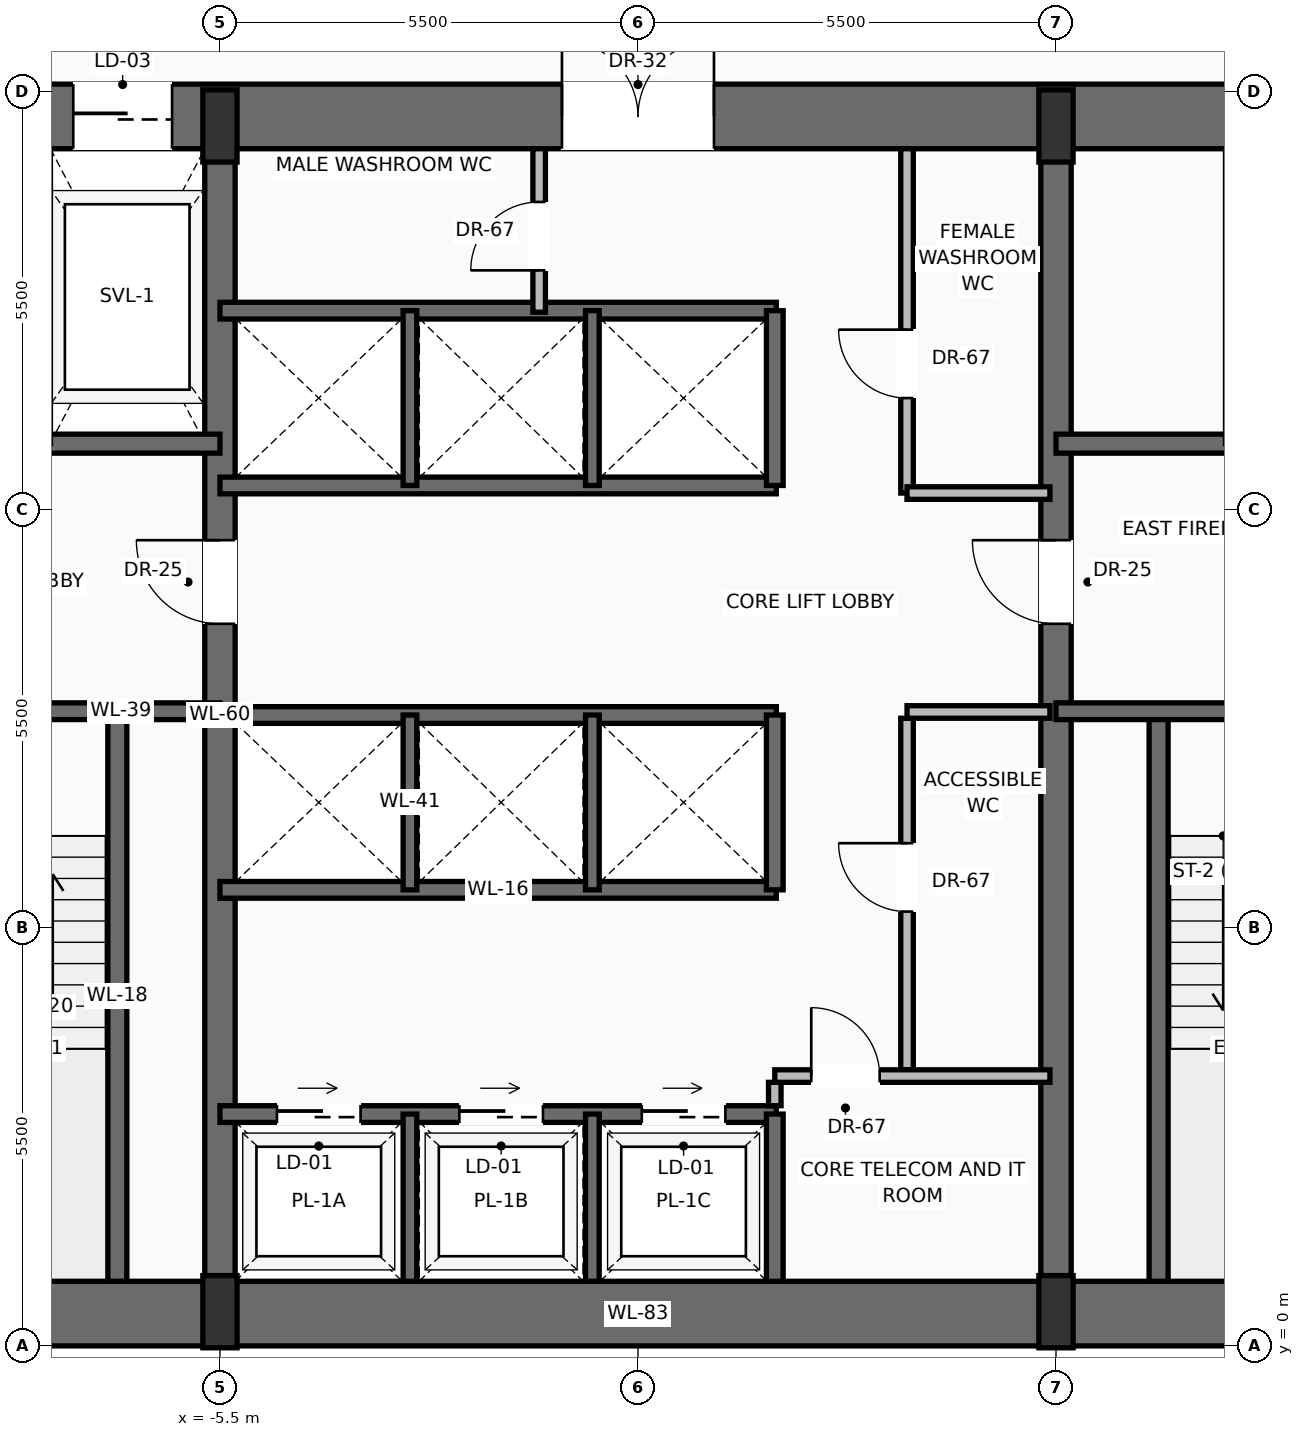
"""IFC4 building model, lengths in metres.
Left out: names, types, materials, properties, quantities, classifications, styles, units other than length and angle.
Written with IfcOpenShell. Run it as: python <this file> out.ifc"""

import sys

from ifc_helpers import new_model, si_unit, direction, frame, frame_2d, origin, origin_2d, place, context, subcontext, project, spatial, rectangle, extrude, source, transform, mapped, element, fill, save


model = new_model("IFC4")
c1 = context("Model", 3, precision=1e-05, world=origin(), true_north=direction((0.0, 1.0)))
c2 = subcontext(c1, "Body", "Model", "MODEL_VIEW")
j1 = project(units=[si_unit("LENGTHUNIT", "METRE"), si_unit("PLANEANGLEUNIT", "RADIAN")], contexts=[c1])
p1 = place(None, origin())
s1 = spatial("IfcSite", under=j1, at=p1, CompositionType="ELEMENT")
p2 = place(p1, origin())
s2 = spatial("IfcBuilding", under=s1, at=p2, CompositionType="ELEMENT")
p3 = place(p2, frame((0.0, 0.0, 60.8)))
s3 = spatial("IfcBuildingStorey", under=s2, at=p3, CompositionType="ELEMENT", Elevation=60.8)
p4 = place(p3, frame((-10.65, 0.425, 0.0), z_axis=(0.0, 0.0, 1.0), x_axis=(1.0, 0.0, 0.0)))
e1 = element("IfcWall", 1, at=p4, inside=s3, PredefinedType="SHEAR", context=c2, shape_type="SweptSolid", body=[
    extrude(rectangle(XDim=21.3, YDim=0.85, at=frame_2d((10.65, 0.0))), origin(), (0.0, 0.0, 1.0), 3.45),
])
p5 = place(p3, frame((-11.0, 16.175, 0.0), z_axis=(0.0, 0.0, 1.0), x_axis=(1.0, 0.0, 0.0)))
e2 = element("IfcWall", 2, at=p5, inside=s3, PredefinedType="SHEAR", context=c2, shape_type="SweptSolid", body=[
    extrude(rectangle(XDim=22.0, YDim=0.85, at=frame_2d((11.0, 0.0))), origin(), (0.0, 0.0, 1.0), 3.45),
])
p6 = place(p5, frame((3.57, 0.0, 0.0)))
e3 = element("IfcOpeningElement", 3, at=p6, cuts=e2, PredefinedType="OPENING", context=c2, shape_type="SweptSolid", body=[
    extrude(rectangle(XDim=1.3, YDim=2.3, at=frame_2d((0.65, 1.15))), frame((0.0, 0.435, 0.0), z_axis=(0.0, -1.0, 0.0), x_axis=(1.0, 0.0, 0.0)), (0.0, 0.0, 1.0), 0.87),
])
p7 = place(p5, frame((10.0, 0.0, 0.0)))
e4 = element("IfcOpeningElement", 4, at=p7, cuts=e2, PredefinedType="OPENING", context=c2, shape_type="SweptSolid", body=[
    extrude(rectangle(XDim=2.0, YDim=2.4, at=frame_2d((1.0, 1.2))), frame((0.0, 0.435, 0.0), z_axis=(0.0, -1.0, 0.0), x_axis=(1.0, 0.0, 0.0)), (0.0, 0.0, 1.0), 0.87),
])
p8 = place(p3, frame((-5.5, 0.425, 0.0), z_axis=(0.0, 0.0, 1.0), x_axis=(0.0, 1.0, 0.0)))
e5 = element("IfcWall", 5, at=p8, inside=s3, PredefinedType="SHEAR", context=c2, shape_type="SweptSolid", body=[
    extrude(rectangle(XDim=15.75, YDim=0.4, at=frame_2d((7.875, 0.0))), origin(), (0.0, 0.0, 1.0), 3.45),
])
p9 = place(p8, frame((9.075, 0.0, 0.0)))
e6 = element("IfcOpeningElement", 6, at=p9, cuts=e5, PredefinedType="OPENING", context=c2, shape_type="SweptSolid", body=[
    extrude(rectangle(XDim=1.1, YDim=2.2, at=frame_2d((0.55, 1.1))), frame((0.0, 0.21, 0.0), z_axis=(0.0, -1.0, 0.0), x_axis=(1.0, 0.0, 0.0)), (0.0, 0.0, 1.0), 0.42),
])
p10 = place(p3, frame((5.5, 0.425, 0.0), z_axis=(0.0, 0.0, 1.0), x_axis=(0.0, 1.0, 0.0)))
e7 = element("IfcWall", 7, at=p10, inside=s3, PredefinedType="SHEAR", context=c2, shape_type="SweptSolid", body=[
    extrude(rectangle(XDim=15.75, YDim=0.4, at=frame_2d((7.875, 0.0))), origin(), (0.0, 0.0, 1.0), 3.45),
])
p11 = place(p10, frame((9.075, 0.0, 0.0)))
e8 = element("IfcOpeningElement", 8, at=p11, cuts=e7, PredefinedType="OPENING", context=c2, shape_type="SweptSolid", body=[
    extrude(rectangle(XDim=1.1, YDim=2.2, at=frame_2d((0.55, 1.1))), frame((0.0, 0.21, 0.0), z_axis=(0.0, -1.0, 0.0), x_axis=(1.0, 0.0, 0.0)), (0.0, 0.0, 1.0), 0.42),
])
m1 = source(origin(), c2, "Body", "SweptSolid", [
    extrude(rectangle(XDim=0.45, YDim=0.95, at=origin_2d()), origin(), (0.0, 0.0, 1.0), 3.7),
])
for number, where, z_axis, x_axis in (
    (9, (-5.5, 0.45, 0.0), (0.0, 0.0, 1.0), (1.0, 0.0, 0.0)),
    (10, (5.5, 0.45, 0.0), (0.0, 0.0, 1.0), (1.0, 0.0, 0.0)),
    (11, (-5.5, 16.05, 0.0), (0.0, 0.0, 1.0), (1.0, 0.0, 0.0)),
    (12, (5.5, 16.05, 0.0), (0.0, 0.0, 1.0), (1.0, 0.0, 0.0)),
):
    element("IfcColumn", number, at=place(p3, frame(where, z_axis=z_axis, x_axis=x_axis)), inside=s3, PredefinedType="PILASTER", context=c2, shape_type="MappedRepresentation", body=[
        mapped(m1, transform((0.0, 0.0, 0.0), scale=1.0)),
    ])
p12 = place(p3, frame((-6.85, 0.85, 0.0), z_axis=(0.0, 0.0, 1.0), x_axis=(0.0, 1.0, 0.0)))
e13 = element("IfcWall", 13, at=p12, inside=s3, PredefinedType="SOLIDWALL", context=c2, shape_type="SweptSolid", body=[
    extrude(rectangle(XDim=7.5, YDim=0.25, at=frame_2d((3.75, 0.0))), origin(), (0.0, 0.0, 1.0), 3.45),
])
p13 = place(p3, frame((-5.5, 8.35, 0.0), z_axis=(0.0, 0.0, 1.0), x_axis=(-1.0, 0.0, 0.0)))
e14 = element("IfcWall", 14, at=p13, inside=s3, PredefinedType="SOLIDWALL", context=c2, shape_type="SweptSolid", body=[
    extrude(rectangle(XDim=4.65, YDim=0.22, at=frame_2d((2.325, 0.0))), origin(), (0.0, 0.0, 1.0), 3.45),
])
p14 = place(p13, frame((2.5, 0.0, 0.0)))
e15 = element("IfcOpeningElement", 15, at=p14, cuts=e14, PredefinedType="OPENING", context=c2, shape_type="SweptSolid", body=[
    extrude(rectangle(XDim=1.15, YDim=2.2, at=frame_2d((0.575, 1.1))), frame((0.0, 0.12, 0.0), z_axis=(0.0, -1.0, 0.0), x_axis=(1.0, 0.0, 0.0)), (0.0, 0.0, 1.0), 0.24),
])
p15 = place(p3, frame((-5.5, 11.87, 0.0), z_axis=(0.0, 0.0, 1.0), x_axis=(-1.0, 0.0, 0.0)))
e16 = element("IfcWall", 16, at=p15, inside=s3, PredefinedType="SOLIDWALL", context=c2, shape_type="SweptSolid", body=[
    extrude(rectangle(XDim=4.65, YDim=0.25, at=frame_2d((2.325, 0.0))), origin(), (0.0, 0.0, 1.0), 3.45),
])
p16 = place(p15, frame((2.95, 0.0, 0.0)))
e17 = element("IfcOpeningElement", 17, at=p16, cuts=e16, PredefinedType="OPENING", context=c2, shape_type="SweptSolid", body=[
    extrude(rectangle(XDim=1.2, YDim=2.25, at=frame_2d((0.6, 1.125))), frame((0.0, 0.135, 0.0), z_axis=(0.0, -1.0, 0.0), x_axis=(1.0, 0.0, 0.0)), (0.0, 0.0, 1.0), 0.27),
])
p17 = place(p3, frame((6.85, 0.85, 0.0), z_axis=(0.0, 0.0, 1.0), x_axis=(0.0, 1.0, 0.0)))
e18 = element("IfcWall", 18, at=p17, inside=s3, PredefinedType="SOLIDWALL", context=c2, shape_type="SweptSolid", body=[
    extrude(rectangle(XDim=7.5, YDim=0.25, at=frame_2d((3.75, 0.0))), origin(), (0.0, 0.0, 1.0), 3.45),
])
p18 = place(p3, frame((10.15, 8.35, 0.0), z_axis=(0.0, 0.0, 1.0), x_axis=(-1.0, 0.0, 0.0)))
e19 = element("IfcWall", 19, at=p18, inside=s3, PredefinedType="SOLIDWALL", context=c2, shape_type="SweptSolid", body=[
    extrude(rectangle(XDim=4.65, YDim=0.22, at=frame_2d((2.325, 0.0))), origin(), (0.0, 0.0, 1.0), 3.45),
])
p19 = place(p18, frame((1.0, 0.0, 0.0)))
e20 = element("IfcOpeningElement", 20, at=p19, cuts=e19, PredefinedType="OPENING", context=c2, shape_type="SweptSolid", body=[
    extrude(rectangle(XDim=1.15, YDim=2.2, at=frame_2d((0.575, 1.1))), frame((0.0, 0.12, 0.0), z_axis=(0.0, -1.0, 0.0), x_axis=(1.0, 0.0, 0.0)), (0.0, 0.0, 1.0), 0.24),
])
p20 = place(p3, frame((10.15, 11.87, 0.0), z_axis=(0.0, 0.0, 1.0), x_axis=(-1.0, 0.0, 0.0)))
e21 = element("IfcWall", 21, at=p20, inside=s3, PredefinedType="SOLIDWALL", context=c2, shape_type="SweptSolid", body=[
    extrude(rectangle(XDim=4.65, YDim=0.25, at=frame_2d((2.325, 0.0))), origin(), (0.0, 0.0, 1.0), 3.45),
])
p21 = place(p20, frame((0.5, 0.0, 0.0)))
e22 = element("IfcOpeningElement", 22, at=p21, cuts=e21, PredefinedType="OPENING", context=c2, shape_type="SweptSolid", body=[
    extrude(rectangle(XDim=1.2, YDim=2.25, at=frame_2d((0.6, 1.125))), frame((0.0, 0.135, 0.0), z_axis=(0.0, -1.0, 0.0), x_axis=(1.0, 0.0, 0.0)), (0.0, 0.0, 1.0), 0.27),
])
p22 = place(p3, frame((-5.5, 3.05, 0.0), z_axis=(0.0, 0.0, 1.0), x_axis=(1.0, 0.0, 0.0)))
e23 = element("IfcWall", 23, at=p22, inside=s3, PredefinedType="SOLIDWALL", context=c2, shape_type="SweptSolid", body=[
    extrude(rectangle(XDim=7.32, YDim=0.22, at=frame_2d((3.66, 0.0))), origin(), (0.0, 0.0, 1.0), 3.45),
])
p23 = place(p22, frame((0.75, 0.0, 0.0)))
e24 = element("IfcOpeningElement", 24, at=p23, cuts=e23, PredefinedType="OPENING", context=c2, shape_type="SweptSolid", body=[
    extrude(rectangle(XDim=1.1, YDim=2.2, at=frame_2d((0.55, 1.1))), frame((0.0, 0.12, 0.0), z_axis=(0.0, -1.0, 0.0), x_axis=(1.0, 0.0, 0.0)), (0.0, 0.0, 1.0), 0.24),
])
p24 = place(p22, frame((3.15, 0.0, 0.0)))
e25 = element("IfcOpeningElement", 25, at=p24, cuts=e23, PredefinedType="OPENING", context=c2, shape_type="SweptSolid", body=[
    extrude(rectangle(XDim=1.1, YDim=2.2, at=frame_2d((0.55, 1.1))), frame((0.0, 0.12, 0.0), z_axis=(0.0, -1.0, 0.0), x_axis=(1.0, 0.0, 0.0)), (0.0, 0.0, 1.0), 0.24),
])
p25 = place(p22, frame((5.55, 0.0, 0.0)))
e26 = element("IfcOpeningElement", 26, at=p25, cuts=e23, PredefinedType="OPENING", context=c2, shape_type="SweptSolid", body=[
    extrude(rectangle(XDim=1.1, YDim=2.2, at=frame_2d((0.55, 1.1))), frame((0.0, 0.12, 0.0), z_axis=(0.0, -1.0, 0.0), x_axis=(1.0, 0.0, 0.0)), (0.0, 0.0, 1.0), 0.24),
])
p26 = place(p3, frame((1.8, 0.85, 0.0), z_axis=(0.0, 0.0, 1.0), x_axis=(0.0, 1.0, 0.0)))
e27 = element("IfcWall", 27, at=p26, inside=s3, PredefinedType="SOLIDWALL", context=c2, shape_type="SweptSolid", body=[
    extrude(rectangle(XDim=2.2, YDim=0.22, at=frame_2d((1.1, 0.0))), origin(), (0.0, 0.0, 1.0), 3.45),
])
for number, where, z_axis, x_axis in (
    (28, (-3.0, 0.85, 0.0), (0.0, 0.0, 1.0), (0.0, 1.0, 0.0)),
    (29, (-0.6, 0.85, 0.0), (0.0, 0.0, 1.0), (0.0, 1.0, 0.0)),
):
    element("IfcWall", number, at=place(p3, frame(where, z_axis=z_axis, x_axis=x_axis)), inside=s3, PredefinedType="SOLIDWALL", context=c2, shape_type="SweptSolid", body=[
        extrude(rectangle(XDim=2.2, YDim=0.18, at=frame_2d((1.1, 0.0))), origin(), (0.0, 0.0, 1.0), 3.45),
    ])
p27 = place(p3, frame((1.8, 3.16, 0.0), z_axis=(0.0, 0.0, 1.0), x_axis=(0.0, 1.0, 0.0)))
e30 = element("IfcWall", 30, at=p27, inside=s3, PredefinedType="PARTITIONING", context=c2, shape_type="SweptSolid", body=[
    extrude(rectangle(XDim=0.308, YDim=0.165, at=frame_2d((0.154, 0.0))), origin(), (0.0, 0.0, 1.0), 3.442),
])
p28 = place(p3, frame((3.54, 3.633, 0.0), z_axis=(0.0, 0.0, 1.0), x_axis=(0.0, 1.0, 0.0)))
e31 = element("IfcWall", 31, at=p28, inside=s3, PredefinedType="PARTITIONING", context=c2, shape_type="SweptSolid", body=[
    extrude(rectangle(XDim=4.625, YDim=0.165, at=frame_2d((2.312, 0.0))), origin(), (0.0, 0.0, 1.0), 3.442),
])
p29 = place(p28, frame((2.081, 0.0, 0.0)))
e32 = element("IfcOpeningElement", 32, at=p29, cuts=e31, PredefinedType="OPENING", context=c2, shape_type="SweptSolid", body=[
    extrude(rectangle(XDim=0.9, YDim=2.1, at=frame_2d((0.45, 1.05))), frame((0.0, 0.093, 0.0), z_axis=(0.0, -1.0, 0.0), x_axis=(1.0, 0.0, 0.0)), (0.0, 0.0, 1.0), 0.185),
])
p30 = place(p3, frame((3.54, 8.34, 0.0), z_axis=(0.0, 0.0, 1.0), x_axis=(1.0, 0.0, 0.0)))
e33 = element("IfcWall", 33, at=p30, inside=s3, PredefinedType="PARTITIONING", context=c2, shape_type="SweptSolid", body=[
    extrude(rectangle(XDim=1.88, YDim=0.165, at=frame_2d((0.94, 0.0))), origin(), (0.0, 0.0, 1.0), 3.442),
])
p31 = place(p3, frame((1.8, 3.55, 0.0), z_axis=(0.0, 0.0, 1.0), x_axis=(1.0, 0.0, 0.0)))
e34 = element("IfcWall", 34, at=p31, inside=s3, PredefinedType="PARTITIONING", context=c2, shape_type="SweptSolid", body=[
    extrude(rectangle(XDim=3.62, YDim=0.165, at=frame_2d((1.81, 0.0))), origin(), (0.0, 0.0, 1.0), 3.442),
])
p32 = place(p31, frame((0.48, 0.0, 0.0)))
e35 = element("IfcOpeningElement", 35, at=p32, cuts=e34, PredefinedType="OPENING", context=c2, shape_type="SweptSolid", body=[
    extrude(rectangle(XDim=0.9, YDim=2.1, at=frame_2d((0.45, 1.05))), frame((0.0, 0.093, 0.0), z_axis=(0.0, -1.0, 0.0), x_axis=(1.0, 0.0, 0.0)), (0.0, 0.0, 1.0), 0.185),
])
for number, where, z_axis, x_axis in (
    (36, (-5.5, 6.0, 0.0), (0.0, 0.0, 1.0), (1.0, 0.0, 0.0)),
    (37, (-5.5, 8.3, 0.0), (0.0, 0.0, 1.0), (1.0, 0.0, 0.0)),
):
    element("IfcWall", number, at=place(p3, frame(where, z_axis=z_axis, x_axis=x_axis)), inside=s3, PredefinedType="SOLIDWALL", context=c2, shape_type="SweptSolid", body=[
        extrude(rectangle(XDim=7.32, YDim=0.22, at=frame_2d((3.66, 0.0))), origin(), (0.0, 0.0, 1.0), 3.45),
    ])
p33 = place(p3, frame((1.8, 6.0, 0.0), z_axis=(0.0, 0.0, 1.0), x_axis=(0.0, 1.0, 0.0)))
e38 = element("IfcWall", 38, at=p33, inside=s3, PredefinedType="SOLIDWALL", context=c2, shape_type="SweptSolid", body=[
    extrude(rectangle(XDim=2.3, YDim=0.22, at=frame_2d((1.15, 0.0))), origin(), (0.0, 0.0, 1.0), 3.45),
])
for number, where, z_axis, x_axis in (
    (39, (-3.0, 6.0, 0.0), (0.0, 0.0, 1.0), (0.0, 1.0, 0.0)),
    (40, (-0.6, 6.0, 0.0), (0.0, 0.0, 1.0), (0.0, 1.0, 0.0)),
):
    element("IfcWall", number, at=place(p3, frame(where, z_axis=z_axis, x_axis=x_axis)), inside=s3, PredefinedType="SOLIDWALL", context=c2, shape_type="SweptSolid", body=[
        extrude(rectangle(XDim=2.3, YDim=0.18, at=frame_2d((1.15, 0.0))), origin(), (0.0, 0.0, 1.0), 3.45),
    ])
for number, where, z_axis, x_axis in (
    (41, (-5.5, 11.32, 0.0), (0.0, 0.0, 1.0), (1.0, 0.0, 0.0)),
    (42, (-5.5, 13.62, 0.0), (0.0, 0.0, 1.0), (1.0, 0.0, 0.0)),
):
    element("IfcWall", number, at=place(p3, frame(where, z_axis=z_axis, x_axis=x_axis)), inside=s3, PredefinedType="SOLIDWALL", context=c2, shape_type="SweptSolid", body=[
        extrude(rectangle(XDim=7.32, YDim=0.22, at=frame_2d((3.66, 0.0))), origin(), (0.0, 0.0, 1.0), 3.45),
    ])
p34 = place(p3, frame((1.8, 11.32, 0.0), z_axis=(0.0, 0.0, 1.0), x_axis=(0.0, 1.0, 0.0)))
e43 = element("IfcWall", 43, at=p34, inside=s3, PredefinedType="SOLIDWALL", context=c2, shape_type="SweptSolid", body=[
    extrude(rectangle(XDim=2.3, YDim=0.22, at=frame_2d((1.15, 0.0))), origin(), (0.0, 0.0, 1.0), 3.45),
])
for number, where, z_axis, x_axis in (
    (44, (-3.0, 11.32, 0.0), (0.0, 0.0, 1.0), (0.0, 1.0, 0.0)),
    (45, (-0.6, 11.32, 0.0), (0.0, 0.0, 1.0), (0.0, 1.0, 0.0)),
):
    element("IfcWall", number, at=place(p3, frame(where, z_axis=z_axis, x_axis=x_axis)), inside=s3, PredefinedType="SOLIDWALL", context=c2, shape_type="SweptSolid", body=[
        extrude(rectangle(XDim=2.3, YDim=0.18, at=frame_2d((1.15, 0.0))), origin(), (0.0, 0.0, 1.0), 3.45),
    ])
p35 = place(p3, frame((-1.3, 13.6, 0.0), z_axis=(0.0, 0.0, 1.0), x_axis=(0.0, 1.0, 0.0)))
e46 = element("IfcWall", 46, at=p35, inside=s3, PredefinedType="PARTITIONING", context=c2, shape_type="SweptSolid", body=[
    extrude(rectangle(XDim=2.15, YDim=0.165, at=frame_2d((1.075, 0.0))), origin(), (0.0, 0.0, 1.0), 3.442),
])
p36 = place(p35, frame((0.55, 0.0, 0.0)))
e47 = element("IfcOpeningElement", 47, at=p36, cuts=e46, PredefinedType="OPENING", context=c2, shape_type="SweptSolid", body=[
    extrude(rectangle(XDim=0.9, YDim=2.1, at=frame_2d((0.45, 1.05))), frame((0.0, 0.093, 0.0), z_axis=(0.0, -1.0, 0.0), x_axis=(1.0, 0.0, 0.0)), (0.0, 0.0, 1.0), 0.185),
])
p37 = place(p3, frame((3.54, 11.22, 0.0), z_axis=(0.0, 0.0, 1.0), x_axis=(0.0, 1.0, 0.0)))
e48 = element("IfcWall", 48, at=p37, inside=s3, PredefinedType="PARTITIONING", context=c2, shape_type="SweptSolid", body=[
    extrude(rectangle(XDim=4.53, YDim=0.165, at=frame_2d((2.265, 0.0))), origin(), (0.0, 0.0, 1.0), 3.442),
])
p38 = place(p37, frame((1.25, 0.0, 0.0)))
e49 = element("IfcOpeningElement", 49, at=p38, cuts=e48, PredefinedType="OPENING", context=c2, shape_type="SweptSolid", body=[
    extrude(rectangle(XDim=0.9, YDim=2.1, at=frame_2d((0.45, 1.05))), frame((0.0, 0.093, 0.0), z_axis=(0.0, -1.0, 0.0), x_axis=(1.0, 0.0, 0.0)), (0.0, 0.0, 1.0), 0.185),
])
p39 = place(p3, frame((3.54, 11.22, 0.0), z_axis=(0.0, 0.0, 1.0), x_axis=(1.0, 0.0, 0.0)))
e50 = element("IfcWall", 50, at=p39, inside=s3, PredefinedType="PARTITIONING", context=c2, shape_type="SweptSolid", body=[
    extrude(rectangle(XDim=1.88, YDim=0.165, at=frame_2d((0.94, 0.0))), origin(), (0.0, 0.0, 1.0), 3.442),
])
m2 = source(origin(), c2, "Body", "SweptSolid", [
    extrude(rectangle(XDim=1.1, YDim=2.2, at=frame_2d((0.55, 1.1))), frame((0.0, 0.025, 0.0), z_axis=(0.0, -1.0, 0.0), x_axis=(1.0, 0.0, 0.0)), (0.0, 0.0, 1.0), 0.05),
])
p40 = place(p9, origin())
e51 = element("IfcDoor", 51, at=p40, inside=s3, OperationType="SINGLE_SWING_RIGHT", PredefinedType="DOOR", context=c2, shape_type="MappedRepresentation", body=[
    mapped(m2, transform((0.0, 0.0, 0.0), scale=1.0)),
])
fill(e6, e51)
m3 = source(origin(), c2, "Body", "SweptSolid", [
    extrude(rectangle(XDim=1.3, YDim=2.3, at=frame_2d((0.65, 1.15))), frame((0.0, 0.025, 0.0), z_axis=(0.0, -1.0, 0.0), x_axis=(1.0, 0.0, 0.0)), (0.0, 0.0, 1.0), 0.05),
])
p41 = place(p6, origin())
e52 = element("IfcDoor", 52, at=p41, inside=s3, OperationType="SLIDING_TO_RIGHT", PredefinedType="DOOR", context=c2, shape_type="MappedRepresentation", body=[
    mapped(m3, transform((0.0, 0.0, 0.0), scale=1.0)),
])
fill(e3, e52)
p42 = place(p11, origin())
e53 = element("IfcDoor", 53, at=p42, inside=s3, OperationType="SINGLE_SWING_RIGHT", PredefinedType="DOOR", context=c2, shape_type="MappedRepresentation", body=[
    mapped(m2, transform((0.0, 0.0, 0.0), scale=1.0)),
])
fill(e8, e53)
m4 = source(origin(), c2, "Body", "SweptSolid", [
    extrude(rectangle(XDim=2.0, YDim=2.4, at=frame_2d((1.0, 1.2))), frame((0.0, 0.025, 0.0), z_axis=(0.0, -1.0, 0.0), x_axis=(1.0, 0.0, 0.0)), (0.0, 0.0, 1.0), 0.05),
])
p43 = place(p7, origin())
e54 = element("IfcDoor", 54, at=p43, inside=s3, OperationType="DOUBLE_DOOR_SINGLE_SWING", PredefinedType="DOOR", context=c2, shape_type="MappedRepresentation", body=[
    mapped(m4, transform((0.0, 0.0, 0.0), scale=1.0)),
])
fill(e4, e54)
m5 = source(origin(), c2, "Body", "SweptSolid", [
    extrude(rectangle(XDim=1.1, YDim=2.2, at=frame_2d((0.55, 1.1))), frame((0.0, 0.025, 0.0), z_axis=(0.0, -1.0, 0.0), x_axis=(1.0, 0.0, 0.0)), (0.0, 0.0, 1.0), 0.05),
])
p44 = place(p23, origin())
e55 = element("IfcDoor", 55, at=p44, inside=s3, OperationType="SLIDING_TO_RIGHT", PredefinedType="DOOR", context=c2, shape_type="MappedRepresentation", body=[
    mapped(m5, transform((0.0, 0.0, 0.0), scale=1.0)),
])
fill(e24, e55)
p45 = place(p24, origin())
e56 = element("IfcDoor", 56, at=p45, inside=s3, OperationType="SLIDING_TO_RIGHT", PredefinedType="DOOR", context=c2, shape_type="MappedRepresentation", body=[
    mapped(m5, transform((0.0, 0.0, 0.0), scale=1.0)),
])
fill(e25, e56)
p46 = place(p25, origin())
e57 = element("IfcDoor", 57, at=p46, inside=s3, OperationType="SLIDING_TO_RIGHT", PredefinedType="DOOR", context=c2, shape_type="MappedRepresentation", body=[
    mapped(m5, transform((0.0, 0.0, 0.0), scale=1.0)),
])
fill(e26, e57)
m6 = source(origin(), c2, "Body", "SweptSolid", [
    extrude(rectangle(XDim=0.9, YDim=2.1, at=frame_2d((0.45, 1.05))), frame((0.0, 0.025, 0.0), z_axis=(0.0, -1.0, 0.0), x_axis=(1.0, 0.0, 0.0)), (0.0, 0.0, 1.0), 0.05),
])
p47 = place(p32, origin())
e58 = element("IfcDoor", 58, at=p47, inside=s3, OperationType="SINGLE_SWING_LEFT", PredefinedType="DOOR", context=c2, shape_type="MappedRepresentation", body=[
    mapped(m6, transform((0.0, 0.0, 0.0), scale=1.0)),
])
fill(e35, e58)
p48 = place(p29, origin())
e59 = element("IfcDoor", 59, at=p48, inside=s3, OperationType="SINGLE_SWING_RIGHT", PredefinedType="DOOR", context=c2, shape_type="MappedRepresentation", body=[
    mapped(m6, transform((0.0, 0.0, 0.0), scale=1.0)),
])
fill(e32, e59)
p49 = place(p36, origin())
e60 = element("IfcDoor", 60, at=p49, inside=s3, OperationType="SINGLE_SWING_LEFT", PredefinedType="DOOR", context=c2, shape_type="MappedRepresentation", body=[
    mapped(m6, transform((0.0, 0.0, 0.0), scale=1.0)),
])
fill(e47, e60)
p50 = place(p38, origin())
e61 = element("IfcDoor", 61, at=p50, inside=s3, OperationType="SINGLE_SWING_RIGHT", PredefinedType="DOOR", context=c2, shape_type="MappedRepresentation", body=[
    mapped(m6, transform((0.0, 0.0, 0.0), scale=1.0)),
])
fill(e49, e61)
save(model, sys.argv[1])
